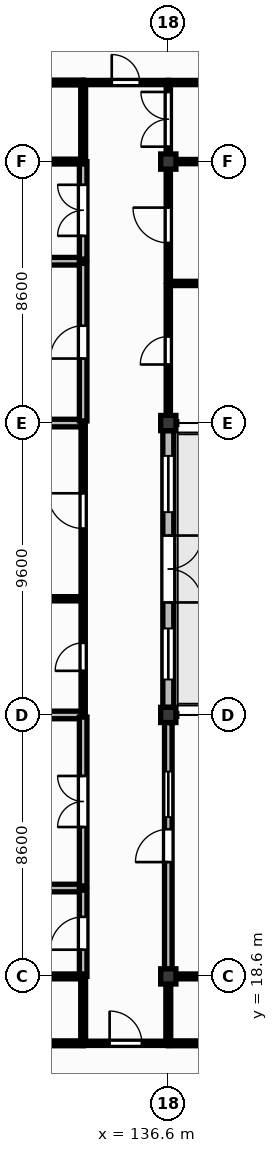
"""IFC4 building model, lengths in metres.
Left out: names, types, materials, properties, quantities, classifications, styles, units other than length and angle.
Written with IfcOpenShell. Run it as: python <this file> out.ifc"""

import sys

from ifc_helpers import new_model, si_unit, direction, frame, frame_2d, origin, origin_2d, place, context, subcontext, project, spatial, rectangle, extrude, element, fill, save


model = new_model("IFC4")
c1 = context("Model", 3, precision=1e-05, world=origin(), true_north=direction((0.0, 1.0)))
c2 = subcontext(c1, "Body", "Model", "MODEL_VIEW")
j1 = project(units=[si_unit("LENGTHUNIT", "METRE"), si_unit("PLANEANGLEUNIT", "RADIAN")], contexts=[c1])
p1 = place(None, origin())
s1 = spatial("IfcSite", under=j1, at=p1, CompositionType="ELEMENT")
p2 = place(p1, origin())
s2 = spatial("IfcBuilding", under=s1, at=p2, CompositionType="ELEMENT")
p3 = place(p2, frame((0.0, 0.0, 4.5)))
s3 = spatial("IfcBuildingStorey", under=s2, at=p3, CompositionType="ELEMENT", Elevation=4.5)
for number, where, z_axis, x_axis in (
    (1, (136.6, 18.6, 0.0), (0.0, 0.0, 1.0), (1.0, 0.0, 0.0)),
    (2, (136.6, 27.2, 0.0), (0.0, 0.0, 1.0), (1.0, 0.0, 0.0)),
    (3, (136.6, 36.8, 0.0), (0.0, 0.0, 1.0), (1.0, 0.0, 0.0)),
    (4, (136.6, 45.4, 0.0), (0.0, 0.0, 1.0), (1.0, 0.0, 0.0)),
):
    element("IfcColumn", number, at=place(p3, frame(where, z_axis=z_axis, x_axis=x_axis)), inside=s3, PredefinedType="COLUMN", context=c2, shape_type="SweptSolid", body=[
        extrude(rectangle(XDim=0.5, YDim=0.5, at=origin_2d()), origin(), (0.0, 0.0, 1.0), 4.22),
    ])
p4 = place(p3, frame((136.6, 27.45, 0.0), z_axis=(0.0, 0.0, 1.0), x_axis=(0.0, 1.0, 0.0)))
e5 = element("IfcWall", 5, at=p4, inside=s3, PredefinedType="SOLIDWALL", context=c2, shape_type="SweptSolid", body=[
    extrude(rectangle(XDim=9.1, YDim=0.36, at=frame_2d((4.55, 0.0))), origin(), (0.0, 0.0, 1.0), 3.52),
])
p5 = place(p4, frame((3.45, 0.0, 0.0)))
e6 = element("IfcOpeningElement", 6, at=p5, cuts=e5, PredefinedType="OPENING", context=c2, shape_type="SweptSolid", body=[
    extrude(rectangle(XDim=2.2, YDim=2.5, at=frame_2d((1.1, 1.25))), frame((0.0, 0.19, 0.0), z_axis=(0.0, -1.0, 0.0), x_axis=(1.0, 0.0, 0.0)), (0.0, 0.0, 1.0), 0.38),
])
p6 = place(p4, frame((0.915, 0.0, 1.5)))
e7 = element("IfcOpeningElement", 7, at=p6, cuts=e5, PredefinedType="OPENING", context=c2, shape_type="SweptSolid", body=[
    extrude(rectangle(XDim=1.68, YDim=1.25, at=frame_2d((0.84, 0.625))), frame((0.0, 0.19, 0.0), z_axis=(0.0, -1.0, 0.0), x_axis=(1.0, 0.0, 0.0)), (0.0, 0.0, 1.0), 0.38),
])
p7 = place(p4, frame((6.42, 0.0, 1.5)))
e8 = element("IfcOpeningElement", 8, at=p7, cuts=e5, PredefinedType="OPENING", context=c2, shape_type="SweptSolid", body=[
    extrude(rectangle(XDim=1.85, YDim=1.25, at=frame_2d((0.925, 0.625))), frame((0.0, 0.19, 0.0), z_axis=(0.0, -1.0, 0.0), x_axis=(1.0, 0.0, 0.0)), (0.0, 0.0, 1.0), 0.38),
])
p8 = place(p3, frame((129.405, 21.507, 0.0), z_axis=(0.0, 0.0, 1.0), x_axis=(1.0, 0.0, 0.0)))
e9 = element("IfcWall", 9, at=p8, inside=s3, PredefinedType="SOLIDWALL", context=c2, shape_type="SweptSolid", body=[
    extrude(rectangle(XDim=4.395, YDim=0.25, at=frame_2d((2.198, 0.0))), origin(), (0.0, 0.0, 1.0), 4.18),
])
p9 = place(p3, frame((130.45, 27.2, 0.0), z_axis=(0.0, 0.0, 1.0), x_axis=(1.0, 0.0, 0.0)))
e10 = element("IfcWall", 10, at=p9, inside=s3, PredefinedType="SOLIDWALL", context=c2, shape_type="SweptSolid", body=[
    extrude(rectangle(XDim=3.35, YDim=0.25, at=frame_2d((1.675, 0.0))), origin(), (0.0, 0.0, 1.0), 3.52),
])
p10 = place(p3, frame((129.405, 31.021, 0.0), z_axis=(0.0, 0.0, 1.0), x_axis=(1.0, 0.0, 0.0)))
e11 = element("IfcWall", 11, at=p10, inside=s3, PredefinedType="PARTITIONING", context=c2, shape_type="SweptSolid", body=[
    extrude(rectangle(XDim=4.395, YDim=0.14, at=frame_2d((2.198, 0.0))), origin(), (0.0, 0.0, 1.0), 4.18),
])
p11 = place(p3, frame((130.45, 36.8, 0.0), z_axis=(0.0, 0.0, 1.0), x_axis=(1.0, 0.0, 0.0)))
e12 = element("IfcWall", 12, at=p11, inside=s3, PredefinedType="SOLIDWALL", context=c2, shape_type="SweptSolid", body=[
    extrude(rectangle(XDim=3.35, YDim=0.25, at=frame_2d((1.675, 0.0))), origin(), (0.0, 0.0, 1.0), 3.52),
])
p12 = place(p3, frame((129.405, 42.123, 0.0), z_axis=(0.0, 0.0, 1.0), x_axis=(1.0, 0.0, 0.0)))
e13 = element("IfcWall", 13, at=p12, inside=s3, PredefinedType="SOLIDWALL", context=c2, shape_type="SweptSolid", body=[
    extrude(rectangle(XDim=4.395, YDim=0.25, at=frame_2d((2.198, 0.0))), origin(), (0.0, 0.0, 1.0), 4.18),
])
p13 = place(p3, frame((133.8, 16.4, 0.0), z_axis=(0.0, 0.0, 1.0), x_axis=(1.0, 0.0, 0.0)))
e14 = element("IfcWall", 14, at=p13, inside=s3, PredefinedType="PARTITIONING", context=c2, shape_type="SweptSolid", body=[
    extrude(rectangle(XDim=2.8, YDim=0.14, at=frame_2d((1.4, 0.0))), origin(), (0.0, 0.0, 1.0), 4.18),
])
p14 = place(p13, frame((0.87, 0.0, 0.0)))
e15 = element("IfcOpeningElement", 15, at=p14, cuts=e14, PredefinedType="OPENING", context=c2, shape_type="SweptSolid", body=[
    extrude(rectangle(XDim=1.06, YDim=2.15, at=frame_2d((0.53, 1.075))), frame((0.0, 0.08, 0.0), z_axis=(0.0, -1.0, 0.0), x_axis=(1.0, 0.0, 0.0)), (0.0, 0.0, 1.0), 0.16),
])
p15 = place(p3, frame((133.8, 18.6, 0.0), z_axis=(0.0, 0.0, 1.0), x_axis=(0.0, 1.0, 0.0)))
e16 = element("IfcWall", 16, at=p15, inside=s3, PredefinedType="SOLIDWALL", context=c2, shape_type="SweptSolid", body=[
    extrude(rectangle(XDim=2.837, YDim=0.25, at=frame_2d((1.418, 0.0))), origin(), (0.0, 0.0, 1.0), 4.18),
])
p16 = place(p15, frame((0.878, 0.0, 0.0)))
e17 = element("IfcOpeningElement", 17, at=p16, cuts=e16, PredefinedType="OPENING", context=c2, shape_type="SweptSolid", body=[
    extrude(rectangle(XDim=1.08, YDim=2.15, at=frame_2d((0.54, 1.075))), frame((0.0, 0.135, 0.0), z_axis=(0.0, -1.0, 0.0), x_axis=(1.0, 0.0, 0.0)), (0.0, 0.0, 1.0), 0.27),
])
p17 = place(p3, frame((133.8, 21.577, 0.0), z_axis=(0.0, 0.0, 1.0), x_axis=(0.0, 1.0, 0.0)))
e18 = element("IfcWall", 18, at=p17, inside=s3, PredefinedType="SOLIDWALL", context=c2, shape_type="SweptSolid", body=[
    extrude(rectangle(XDim=5.553, YDim=0.25, at=frame_2d((2.776, 0.0))), origin(), (0.0, 0.0, 1.0), 4.18),
])
p18 = place(p17, frame((1.937, 0.0, 0.0)))
e19 = element("IfcOpeningElement", 19, at=p18, cuts=e18, PredefinedType="OPENING", context=c2, shape_type="SweptSolid", body=[
    extrude(rectangle(XDim=1.68, YDim=2.3, at=frame_2d((0.84, 1.15))), frame((0.0, 0.135, 0.0), z_axis=(0.0, -1.0, 0.0), x_axis=(1.0, 0.0, 0.0)), (0.0, 0.0, 1.0), 0.27),
])
p19 = place(p3, frame((133.8, 27.27, 0.0), z_axis=(0.0, 0.0, 1.0), x_axis=(0.0, 1.0, 0.0)))
e20 = element("IfcWall", 20, at=p19, inside=s3, PredefinedType="PARTITIONING", context=c2, shape_type="SweptSolid", body=[
    extrude(rectangle(XDim=3.681, YDim=0.14, at=frame_2d((1.84, 0.0))), origin(), (0.0, 0.0, 1.0), 4.18),
])
p20 = place(p19, frame((1.381, 0.0, 0.0)))
e21 = element("IfcOpeningElement", 21, at=p20, cuts=e20, PredefinedType="OPENING", context=c2, shape_type="SweptSolid", body=[
    extrude(rectangle(XDim=0.92, YDim=2.1, at=frame_2d((0.46, 1.05))), frame((0.0, 0.08, 0.0), z_axis=(0.0, -1.0, 0.0), x_axis=(1.0, 0.0, 0.0)), (0.0, 0.0, 1.0), 0.16),
])
p21 = place(p3, frame((133.8, 31.091, 0.0), z_axis=(0.0, 0.0, 1.0), x_axis=(0.0, 1.0, 0.0)))
e22 = element("IfcWall", 22, at=p21, inside=s3, PredefinedType="PARTITIONING", context=c2, shape_type="SweptSolid", body=[
    extrude(rectangle(XDim=5.639, YDim=0.14, at=frame_2d((2.819, 0.0))), origin(), (0.0, 0.0, 1.0), 4.18),
])
p22 = place(p21, frame((2.24, 0.0, 0.0)))
e23 = element("IfcOpeningElement", 23, at=p22, cuts=e22, PredefinedType="OPENING", context=c2, shape_type="SweptSolid", body=[
    extrude(rectangle(XDim=1.16, YDim=2.1, at=frame_2d((0.58, 1.05))), frame((0.0, 0.08, 0.0), z_axis=(0.0, -1.0, 0.0), x_axis=(1.0, 0.0, 0.0)), (0.0, 0.0, 1.0), 0.16),
])
p23 = place(p3, frame((133.8, 36.87, 0.0), z_axis=(0.0, 0.0, 1.0), x_axis=(0.0, 1.0, 0.0)))
e24 = element("IfcWall", 24, at=p23, inside=s3, PredefinedType="SOLIDWALL", context=c2, shape_type="SweptSolid", body=[
    extrude(rectangle(XDim=5.183, YDim=0.25, at=frame_2d((2.591, 0.0))), origin(), (0.0, 0.0, 1.0), 4.18),
])
p24 = place(p23, frame((2.052, 0.0, 0.0)))
e25 = element("IfcOpeningElement", 25, at=p24, cuts=e24, PredefinedType="OPENING", context=c2, shape_type="SweptSolid", body=[
    extrude(rectangle(XDim=1.08, YDim=2.15, at=frame_2d((0.54, 1.075))), frame((0.0, 0.135, 0.0), z_axis=(0.0, -1.0, 0.0), x_axis=(1.0, 0.0, 0.0)), (0.0, 0.0, 1.0), 0.27),
])
p25 = place(p3, frame((133.8, 42.193, 0.0), z_axis=(0.0, 0.0, 1.0), x_axis=(0.0, 1.0, 0.0)))
e26 = element("IfcWall", 26, at=p25, inside=s3, PredefinedType="SOLIDWALL", context=c2, shape_type="SweptSolid", body=[
    extrude(rectangle(XDim=3.207, YDim=0.25, at=frame_2d((1.604, 0.0))), origin(), (0.0, 0.0, 1.0), 4.18),
])
p26 = place(p25, frame((0.763, 0.0, 0.0)))
e27 = element("IfcOpeningElement", 27, at=p26, cuts=e26, PredefinedType="OPENING", context=c2, shape_type="SweptSolid", body=[
    extrude(rectangle(XDim=1.68, YDim=2.3, at=frame_2d((0.84, 1.15))), frame((0.0, 0.135, 0.0), z_axis=(0.0, -1.0, 0.0), x_axis=(1.0, 0.0, 0.0)), (0.0, 0.0, 1.0), 0.27),
])
p27 = place(p3, frame((133.8, 48.0, 0.0), z_axis=(0.0, 0.0, 1.0), x_axis=(1.0, 0.0, 0.0)))
e28 = element("IfcWall", 28, at=p27, inside=s3, PredefinedType="PARTITIONING", context=c2, shape_type="SweptSolid", body=[
    extrude(rectangle(XDim=2.8, YDim=0.14, at=frame_2d((1.4, 0.0))), origin(), (0.0, 0.0, 1.0), 4.18),
])
p28 = place(p27, frame((0.94, 0.0, 0.0)))
e29 = element("IfcOpeningElement", 29, at=p28, cuts=e28, PredefinedType="OPENING", context=c2, shape_type="SweptSolid", body=[
    extrude(rectangle(XDim=0.92, YDim=2.1, at=frame_2d((0.46, 1.05))), frame((0.0, 0.08, 0.0), z_axis=(0.0, -1.0, 0.0), x_axis=(1.0, 0.0, 0.0)), (0.0, 0.0, 1.0), 0.16),
])
p29 = place(p3, frame((136.6, 18.85, 0.0), z_axis=(0.0, 0.0, 1.0), x_axis=(0.0, 1.0, 0.0)))
e30 = element("IfcWall", 30, at=p29, inside=s3, PredefinedType="SOLIDWALL", context=c2, shape_type="SweptSolid", body=[
    extrude(rectangle(XDim=8.1, YDim=0.25, at=frame_2d((4.05, 0.0))), origin(), (0.0, 0.0, 1.0), 3.52),
])
p30 = place(p29, frame((3.51, 0.0, 0.0)))
e31 = element("IfcOpeningElement", 31, at=p30, cuts=e30, PredefinedType="OPENING", context=c2, shape_type="SweptSolid", body=[
    extrude(rectangle(XDim=1.08, YDim=2.15, at=frame_2d((0.54, 1.075))), frame((0.0, 0.135, 0.0), z_axis=(0.0, -1.0, 0.0), x_axis=(1.0, 0.0, 0.0)), (0.0, 0.0, 1.0), 0.27),
])
p31 = place(p29, frame((4.99, 0.0, 1.1)))
e32 = element("IfcOpeningElement", 32, at=p31, cuts=e30, PredefinedType="OPENING", context=c2, shape_type="SweptSolid", body=[
    extrude(rectangle(XDim=1.5, YDim=1.0, at=frame_2d((0.75, 0.5))), frame((0.0, 0.135, 0.0), z_axis=(0.0, -1.0, 0.0), x_axis=(1.0, 0.0, 0.0)), (0.0, 0.0, 1.0), 0.27),
])
p32 = place(p3, frame((136.6, 37.05, 0.0), z_axis=(0.0, 0.0, 1.0), x_axis=(0.0, 1.0, 0.0)))
e33 = element("IfcWall", 33, at=p32, inside=s3, PredefinedType="PARTITIONING", context=c2, shape_type="SweptSolid", body=[
    extrude(rectangle(XDim=4.272, YDim=0.14, at=frame_2d((2.136, 0.0))), origin(), (0.0, 0.0, 1.0), 3.52),
])
p33 = place(p32, frame((1.676, 0.0, 0.0)))
e34 = element("IfcOpeningElement", 34, at=p33, cuts=e33, PredefinedType="OPENING", context=c2, shape_type="SweptSolid", body=[
    extrude(rectangle(XDim=0.92, YDim=2.1, at=frame_2d((0.46, 1.05))), frame((0.0, 0.08, 0.0), z_axis=(0.0, -1.0, 0.0), x_axis=(1.0, 0.0, 0.0)), (0.0, 0.0, 1.0), 0.16),
])
p34 = place(p3, frame((136.6, 41.462, 0.0), z_axis=(0.0, 0.0, 1.0), x_axis=(0.0, 1.0, 0.0)))
e35 = element("IfcWall", 35, at=p34, inside=s3, PredefinedType="PARTITIONING", context=c2, shape_type="SweptSolid", body=[
    extrude(rectangle(XDim=3.688, YDim=0.14, at=frame_2d((1.844, 0.0))), origin(), (0.0, 0.0, 1.0), 3.52),
])
p35 = place(p34, frame((1.264, 0.0, 0.0)))
e36 = element("IfcOpeningElement", 36, at=p35, cuts=e35, PredefinedType="OPENING", context=c2, shape_type="SweptSolid", body=[
    extrude(rectangle(XDim=1.16, YDim=2.1, at=frame_2d((0.58, 1.05))), frame((0.0, 0.08, 0.0), z_axis=(0.0, -1.0, 0.0), x_axis=(1.0, 0.0, 0.0)), (0.0, 0.0, 1.0), 0.16),
])
p36 = place(p3, frame((136.6, 41.392, 0.0), z_axis=(0.0, 0.0, 1.0), x_axis=(1.0, 0.0, 0.0)))
e37 = element("IfcWall", 37, at=p36, inside=s3, PredefinedType="PARTITIONING", context=c2, shape_type="SweptSolid", body=[
    extrude(rectangle(XDim=7.2, YDim=0.14, at=frame_2d((3.6, 0.0))), origin(), (0.0, 0.0, 1.0), 4.18),
])
p37 = place(p3, frame((136.6, 45.65, 0.0), z_axis=(0.0, 0.0, 1.0), x_axis=(0.0, 1.0, 0.0)))
e38 = element("IfcWall", 38, at=p37, inside=s3, PredefinedType="PARTITIONING", context=c2, shape_type="SweptSolid", body=[
    extrude(rectangle(XDim=2.28, YDim=0.14, at=frame_2d((1.14, 0.0))), origin(), (0.0, 0.0, 1.0), 3.52),
])
p38 = place(p37, frame((0.24, 0.0, 0.0)))
e39 = element("IfcOpeningElement", 39, at=p38, cuts=e38, PredefinedType="OPENING", context=c2, shape_type="SweptSolid", body=[
    extrude(rectangle(XDim=1.8, YDim=2.3, at=frame_2d((0.9, 1.15))), frame((0.0, 0.08, 0.0), z_axis=(0.0, -1.0, 0.0), x_axis=(1.0, 0.0, 0.0)), (0.0, 0.0, 1.0), 0.16),
])
p39 = place(p3, frame((136.85, 45.4, 0.0), z_axis=(0.0, 0.0, 1.0), x_axis=(1.0, 0.0, 0.0)))
e40 = element("IfcWall", 40, at=p39, inside=s3, PredefinedType="PARTITIONING", context=c2, shape_type="SweptSolid", body=[
    extrude(rectangle(XDim=3.84, YDim=0.14, at=frame_2d((1.92, 0.0))), origin(), (0.0, 0.0, 1.0), 3.52),
])
p40 = place(p3, frame((136.6, 48.0, 0.0), z_axis=(0.0, 0.0, 1.0), x_axis=(1.0, 0.0, 0.0)))
e41 = element("IfcWall", 41, at=p40, inside=s3, PredefinedType="PARTITIONING", context=c2, shape_type="SweptSolid", body=[
    extrude(rectangle(XDim=4.09, YDim=0.14, at=frame_2d((2.045, 0.0))), origin(), (0.0, 0.0, 1.0), 4.18),
])
p41 = place(p3, frame((147.6, 16.4, 0.0), z_axis=(0.0, 0.0, 1.0), x_axis=(-1.0, 0.0, 0.0)))
e42 = element("IfcWall", 42, at=p41, inside=s3, PredefinedType="PARTITIONING", context=c2, shape_type="SweptSolid", body=[
    extrude(rectangle(XDim=11.0, YDim=0.16, at=frame_2d((5.5, 0.0))), origin(), (0.0, 0.0, 1.0), 4.18),
])
for number, where, z_axis, x_axis in (
    (43, (133.8, 16.4, 0.0), (0.0, 0.0, 1.0), (-1.0, 0.0, 0.0)),
    (44, (129.405, 48.0, 0.0), (0.0, 0.0, 1.0), (1.0, 0.0, 0.0)),
):
    element("IfcWall", number, at=place(p3, frame(where, z_axis=z_axis, x_axis=x_axis)), inside=s3, PredefinedType="PARTITIONING", context=c2, shape_type="SweptSolid", body=[
        extrude(rectangle(XDim=4.395, YDim=0.16, at=frame_2d((2.198, 0.0))), origin(), (0.0, 0.0, 1.0), 4.18),
    ])
p42 = place(p3, frame((136.6, 16.47, 0.0), z_axis=(0.0, 0.0, 1.0), x_axis=(0.0, 1.0, 0.0)))
e45 = element("IfcWall", 45, at=p42, inside=s3, PredefinedType="PARTITIONING", context=c2, shape_type="SweptSolid", body=[
    extrude(rectangle(XDim=1.88, YDim=0.16, at=frame_2d((0.94, 0.0))), origin(), (0.0, 0.0, 1.0), 3.52),
])
p43 = place(p3, frame((133.8, 45.4, 0.0), z_axis=(0.0, 0.0, 1.0), x_axis=(0.0, 1.0, 0.0)))
e46 = element("IfcWall", 46, at=p43, inside=s3, PredefinedType="PARTITIONING", context=c2, shape_type="SweptSolid", body=[
    extrude(rectangle(XDim=2.53, YDim=0.16, at=frame_2d((1.265, 0.0))), origin(), (0.0, 0.0, 1.0), 4.18),
])
p44 = place(p3, frame((133.8, 16.47, 0.0), z_axis=(0.0, 0.0, 1.0), x_axis=(0.0, 1.0, 0.0)))
e47 = element("IfcWall", 47, at=p44, inside=s3, PredefinedType="PARTITIONING", context=c2, shape_type="SweptSolid", body=[
    extrude(rectangle(XDim=2.13, YDim=0.16, at=frame_2d((1.065, 0.0))), origin(), (0.0, 0.0, 1.0), 4.18),
])
for number, where, z_axis, x_axis in (
    (48, (130.45, 18.6, 0.0), (0.0, 0.0, 1.0), (1.0, 0.0, 0.0)),
    (49, (133.8, 45.4, 0.0), (0.0, 0.0, 1.0), (-1.0, 0.0, 0.0)),
):
    element("IfcWall", number, at=place(p3, frame(where, z_axis=z_axis, x_axis=x_axis)), inside=s3, PredefinedType="PARTITIONING", context=c2, shape_type="SweptSolid", body=[
        extrude(rectangle(XDim=3.35, YDim=0.16, at=frame_2d((1.675, 0.0))), origin(), (0.0, 0.0, 1.0), 3.52),
    ])
p45 = place(p3, frame((136.85, 18.6, 0.0), z_axis=(0.0, 0.0, 1.0), x_axis=(1.0, 0.0, 0.0)))
e50 = element("IfcWall", 50, at=p45, inside=s3, PredefinedType="PARTITIONING", context=c2, shape_type="SweptSolid", body=[
    extrude(rectangle(XDim=2.493, YDim=0.16, at=frame_2d((1.247, 0.0))), origin(), (0.0, 0.0, 1.0), 3.52),
])
p46 = place(p5, frame((2.2, 0.0, 0.0), z_axis=(0.0, 0.0, 1.0), x_axis=(-1.0, 0.0, 0.0)))
e51 = element("IfcDoor", 51, at=p46, inside=s3, OperationType="DOUBLE_DOOR_SINGLE_SWING", PredefinedType="DOOR", context=c2, shape_type="SweptSolid", body=[
    extrude(rectangle(XDim=2.2, YDim=2.5, at=frame_2d((1.1, 1.25))), frame((0.0, 0.025, 0.0), z_axis=(0.0, -1.0, 0.0), x_axis=(1.0, 0.0, 0.0)), (0.0, 0.0, 1.0), 0.05),
])
fill(e6, e51)
p47 = place(p6, origin())
e52 = element("IfcWindow", 52, at=p47, inside=s3, PartitioningType="DOUBLE_PANEL_VERTICAL", PredefinedType="WINDOW", context=c2, shape_type="SweptSolid", body=[
    extrude(rectangle(XDim=1.68, YDim=1.25, at=frame_2d((0.84, 0.625))), frame((0.0, 0.03, 0.0), z_axis=(0.0, -1.0, 0.0), x_axis=(1.0, 0.0, 0.0)), (0.0, 0.0, 1.0), 0.06),
])
fill(e7, e52)
p48 = place(p7, origin())
e53 = element("IfcWindow", 53, at=p48, inside=s3, PartitioningType="DOUBLE_PANEL_VERTICAL", PredefinedType="WINDOW", context=c2, shape_type="SweptSolid", body=[
    extrude(rectangle(XDim=1.85, YDim=1.25, at=frame_2d((0.925, 0.625))), frame((0.0, 0.03, 0.0), z_axis=(0.0, -1.0, 0.0), x_axis=(1.0, 0.0, 0.0)), (0.0, 0.0, 1.0), 0.06),
])
fill(e8, e53)
p49 = place(p14, origin())
e54 = element("IfcDoor", 54, at=p49, inside=s3, OperationType="SINGLE_SWING_LEFT", PredefinedType="DOOR", context=c2, shape_type="SweptSolid", body=[
    extrude(rectangle(XDim=1.06, YDim=2.15, at=frame_2d((0.53, 1.075))), frame((0.0, 0.025, 0.0), z_axis=(0.0, -1.0, 0.0), x_axis=(1.0, 0.0, 0.0)), (0.0, 0.0, 1.0), 0.05),
])
fill(e15, e54)
p50 = place(p28, origin())
e55 = element("IfcDoor", 55, at=p50, inside=s3, OperationType="SINGLE_SWING_LEFT", PredefinedType="DOOR", context=c2, shape_type="SweptSolid", body=[
    extrude(rectangle(XDim=0.92, YDim=2.1, at=frame_2d((0.46, 1.05))), frame((0.0, 0.025, 0.0), z_axis=(0.0, -1.0, 0.0), x_axis=(1.0, 0.0, 0.0)), (0.0, 0.0, 1.0), 0.05),
])
fill(e29, e55)
p51 = place(p16, origin())
e56 = element("IfcDoor", 56, at=p51, inside=s3, OperationType="SINGLE_SWING_LEFT", PredefinedType="DOOR", context=c2, shape_type="SweptSolid", body=[
    extrude(rectangle(XDim=1.08, YDim=2.15, at=frame_2d((0.54, 1.075))), frame((0.0, 0.025, 0.0), z_axis=(0.0, -1.0, 0.0), x_axis=(1.0, 0.0, 0.0)), (0.0, 0.0, 1.0), 0.05),
])
fill(e17, e56)
p52 = place(p18, origin())
e57 = element("IfcDoor", 57, at=p52, inside=s3, OperationType="DOUBLE_DOOR_SINGLE_SWING", PredefinedType="DOOR", context=c2, shape_type="SweptSolid", body=[
    extrude(rectangle(XDim=1.68, YDim=2.3, at=frame_2d((0.84, 1.15))), frame((0.0, 0.025, 0.0), z_axis=(0.0, -1.0, 0.0), x_axis=(1.0, 0.0, 0.0)), (0.0, 0.0, 1.0), 0.05),
])
fill(e19, e57)
p53 = place(p20, origin())
e58 = element("IfcDoor", 58, at=p53, inside=s3, OperationType="SINGLE_SWING_LEFT", PredefinedType="DOOR", context=c2, shape_type="SweptSolid", body=[
    extrude(rectangle(XDim=0.92, YDim=2.1, at=frame_2d((0.46, 1.05))), frame((0.0, 0.025, 0.0), z_axis=(0.0, -1.0, 0.0), x_axis=(1.0, 0.0, 0.0)), (0.0, 0.0, 1.0), 0.05),
])
fill(e21, e58)
p54 = place(p22, origin())
e59 = element("IfcDoor", 59, at=p54, inside=s3, OperationType="SINGLE_SWING_RIGHT", PredefinedType="DOOR", context=c2, shape_type="SweptSolid", body=[
    extrude(rectangle(XDim=1.16, YDim=2.1, at=frame_2d((0.58, 1.05))), frame((0.0, 0.025, 0.0), z_axis=(0.0, -1.0, 0.0), x_axis=(1.0, 0.0, 0.0)), (0.0, 0.0, 1.0), 0.05),
])
fill(e23, e59)
p55 = place(p24, origin())
e60 = element("IfcDoor", 60, at=p55, inside=s3, OperationType="SINGLE_SWING_LEFT", PredefinedType="DOOR", context=c2, shape_type="SweptSolid", body=[
    extrude(rectangle(XDim=1.08, YDim=2.15, at=frame_2d((0.54, 1.075))), frame((0.0, 0.025, 0.0), z_axis=(0.0, -1.0, 0.0), x_axis=(1.0, 0.0, 0.0)), (0.0, 0.0, 1.0), 0.05),
])
fill(e25, e60)
p56 = place(p26, origin())
e61 = element("IfcDoor", 61, at=p56, inside=s3, OperationType="DOUBLE_DOOR_SINGLE_SWING", PredefinedType="DOOR", context=c2, shape_type="SweptSolid", body=[
    extrude(rectangle(XDim=1.68, YDim=2.3, at=frame_2d((0.84, 1.15))), frame((0.0, 0.025, 0.0), z_axis=(0.0, -1.0, 0.0), x_axis=(1.0, 0.0, 0.0)), (0.0, 0.0, 1.0), 0.05),
])
fill(e27, e61)
p57 = place(p30, origin())
e62 = element("IfcDoor", 62, at=p57, inside=s3, OperationType="SINGLE_SWING_LEFT", PredefinedType="DOOR", context=c2, shape_type="SweptSolid", body=[
    extrude(rectangle(XDim=1.08, YDim=2.15, at=frame_2d((0.54, 1.075))), frame((0.0, 0.025, 0.0), z_axis=(0.0, -1.0, 0.0), x_axis=(1.0, 0.0, 0.0)), (0.0, 0.0, 1.0), 0.05),
])
fill(e31, e62)
p58 = place(p31, origin())
e63 = element("IfcWindow", 63, at=p58, inside=s3, PartitioningType="SINGLE_PANEL", PredefinedType="WINDOW", context=c2, shape_type="SweptSolid", body=[
    extrude(rectangle(XDim=1.5, YDim=1.0, at=frame_2d((0.75, 0.5))), frame((0.0, 0.03, 0.0), z_axis=(0.0, -1.0, 0.0), x_axis=(1.0, 0.0, 0.0)), (0.0, 0.0, 1.0), 0.06),
])
fill(e32, e63)
p59 = place(p33, origin())
e64 = element("IfcDoor", 64, at=p59, inside=s3, OperationType="SINGLE_SWING_LEFT", PredefinedType="DOOR", context=c2, shape_type="SweptSolid", body=[
    extrude(rectangle(XDim=0.92, YDim=2.1, at=frame_2d((0.46, 1.05))), frame((0.0, 0.025, 0.0), z_axis=(0.0, -1.0, 0.0), x_axis=(1.0, 0.0, 0.0)), (0.0, 0.0, 1.0), 0.05),
])
fill(e34, e64)
p60 = place(p35, origin())
e65 = element("IfcDoor", 65, at=p60, inside=s3, OperationType="SINGLE_SWING_RIGHT", PredefinedType="DOOR", context=c2, shape_type="SweptSolid", body=[
    extrude(rectangle(XDim=1.16, YDim=2.1, at=frame_2d((0.58, 1.05))), frame((0.0, 0.025, 0.0), z_axis=(0.0, -1.0, 0.0), x_axis=(1.0, 0.0, 0.0)), (0.0, 0.0, 1.0), 0.05),
])
fill(e36, e65)
p61 = place(p38, origin())
e66 = element("IfcDoor", 66, at=p61, inside=s3, OperationType="DOUBLE_DOOR_SINGLE_SWING", PredefinedType="DOOR", context=c2, shape_type="SweptSolid", body=[
    extrude(rectangle(XDim=1.8, YDim=2.3, at=frame_2d((0.9, 1.15))), frame((0.0, 0.025, 0.0), z_axis=(0.0, -1.0, 0.0), x_axis=(1.0, 0.0, 0.0)), (0.0, 0.0, 1.0), 0.05),
])
fill(e39, e66)
save(model, sys.argv[1])
